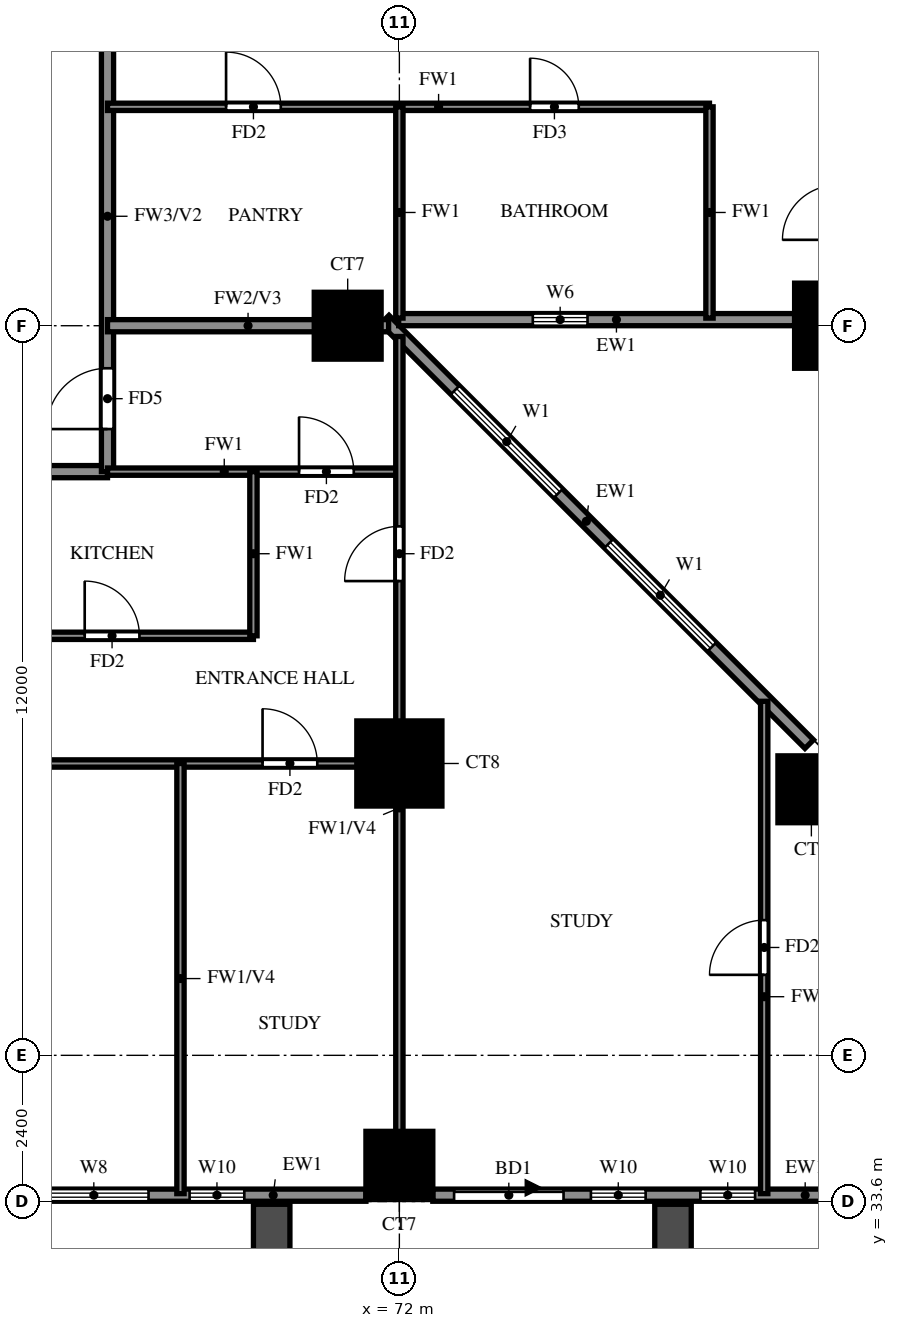
"""IFC4 building model, lengths in metres.
Left out: names, types, materials, properties, quantities, classifications, styles, units other than length and angle.
Written with IfcOpenShell. Run it as: python <this file> out.ifc"""

import sys

from ifc_helpers import new_model, si_unit, direction, frame, frame_2d, origin, origin_2d, place, context, subcontext, project, spatial, rectangle, extrude, source, transform, mapped, element, fill, save


model = new_model("IFC4")
c1 = context("Model", 3, precision=1e-05, world=origin(), true_north=direction((0.0, 1.0)))
c2 = subcontext(c1, "Body", "Model", "MODEL_VIEW")
j1 = project(units=[si_unit("LENGTHUNIT", "METRE"), si_unit("PLANEANGLEUNIT", "RADIAN")], contexts=[c1])
p1 = place(None, origin())
s1 = spatial("IfcSite", under=j1, at=p1, CompositionType="ELEMENT")
p2 = place(p1, origin())
s2 = spatial("IfcBuilding", under=s1, at=p2, CompositionType="ELEMENT")
p3 = place(p2, frame((0.0, 0.0, 51.5)))
s3 = spatial("IfcBuildingStorey", under=s2, at=p3, CompositionType="ELEMENT", Elevation=51.5)
m1 = source(origin(), c2, "Body", "SweptSolid", [
    extrude(rectangle(XDim=1.1, YDim=1.1, at=origin_2d()), origin(), (0.0, 0.0, 1.0), 3.18),
])
for number, where, z_axis, x_axis in (
    (1, (72.0, 34.2, 0.0), (0.0, 0.0, 1.0), (1.0, 0.0, 0.0)),
    (2, (78.776, 40.376, 0.0), (0.0, 0.0, 1.0), (1.0, 0.0, 0.0)),
):
    element("IfcColumn", number, at=place(p3, frame(where, z_axis=z_axis, x_axis=x_axis)), inside=s3, PredefinedType="COLUMN", context=c2, shape_type="MappedRepresentation", body=[
        mapped(m1, transform((0.0, 0.0, 0.0))),
    ])
m2 = source(origin(), c2, "Body", "SweptSolid", [
    extrude(rectangle(XDim=1.4, YDim=1.4, at=origin_2d()), origin(), (0.0, 0.0, 1.0), 3.18),
])
p4 = place(p3, frame((72.0, 40.8, 0.0), z_axis=(0.0, 0.0, 1.0), x_axis=(1.0, 0.0, 0.0)))
e3 = element("IfcColumn", 3, at=p4, inside=s3, PredefinedType="COLUMN", context=c2, shape_type="MappedRepresentation", body=[
    mapped(m2, transform((0.0, 0.0, 0.0))),
])
p5 = place(p3, frame((71.15, 48.0, 0.0), z_axis=(0.0, 0.0, 1.0), x_axis=(1.0, 0.0, 0.0)))
e4 = element("IfcColumn", 4, at=p5, inside=s3, PredefinedType="COLUMN", context=c2, shape_type="MappedRepresentation", body=[
    mapped(m1, transform((0.0, 0.0, 0.0))),
])
p6 = place(p3, frame((79.2, 48.0, 0.0), z_axis=(0.0, 0.0, 1.0), x_axis=(1.0, 0.0, 0.0)))
e5 = element("IfcColumn", 5, at=p6, inside=s3, PredefinedType="COLUMN", context=c2, shape_type="MappedRepresentation", body=[
    mapped(m2, transform((0.0, 0.0, 0.0))),
])
p7 = place(p3, frame((78.74, 41.118, 0.0), z_axis=(0.0, 0.0, 1.0), x_axis=(-0.707106781187, 0.707106781187, 0.0)))
e6 = element("IfcWall", 6, at=p7, inside=s3, PredefinedType="SOLIDWALL", context=c2, shape_type="SweptSolid", body=[
    extrude(rectangle(XDim=9.874, YDim=0.2, at=frame_2d((4.937, 0.0))), origin(), (0.0, 0.0, 1.0), 3.18),
])
p8 = place(p7, frame((2.264, 0.0, 0.6)))
e7 = element("IfcOpeningElement", 7, at=p8, cuts=e6, PredefinedType="OPENING", context=c2, shape_type="SweptSolid", body=[
    extrude(rectangle(XDim=2.4, YDim=2.4, at=frame_2d((1.2, 1.2))), frame((0.0, 0.11, 0.0), z_axis=(0.0, -1.0, 0.0), x_axis=(1.0, 0.0, 0.0)), (0.0, 0.0, 1.0), 0.22),
])
p9 = place(p7, frame((5.836, 0.0, 0.6)))
e8 = element("IfcOpeningElement", 8, at=p9, cuts=e6, PredefinedType="OPENING", context=c2, shape_type="SweptSolid", body=[
    extrude(rectangle(XDim=2.4, YDim=2.4, at=frame_2d((1.2, 1.2))), frame((0.0, 0.11, 0.0), z_axis=(0.0, -1.0, 0.0), x_axis=(1.0, 0.0, 0.0)), (0.0, 0.0, 1.0), 0.22),
])
p10 = place(p3, frame((71.989, 48.1, 0.0), z_axis=(0.0, 0.0, 1.0), x_axis=(1.0, 0.0, 0.0)))
e9 = element("IfcWall", 9, at=p10, inside=s3, PredefinedType="SOLIDWALL", context=c2, shape_type="SweptSolid", body=[
    extrude(rectangle(XDim=6.511, YDim=0.2, at=frame_2d((3.256, 0.0))), origin(), (0.0, 0.0, 1.0), 3.18),
])
p11 = place(p10, frame((2.206, 0.0, 1.5)))
e10 = element("IfcOpeningElement", 10, at=p11, cuts=e9, PredefinedType="OPENING", context=c2, shape_type="SweptSolid", body=[
    extrude(rectangle(XDim=0.9, YDim=0.9, at=frame_2d((0.45, 0.45))), frame((0.0, 0.11, 0.0), z_axis=(0.0, -1.0, 0.0), x_axis=(1.0, 0.0, 0.0)), (0.0, 0.0, 1.0), 0.22),
])
p12 = place(p3, frame((65.35, 33.7, 0.0), z_axis=(0.0, 0.0, 1.0), x_axis=(1.0, 0.0, 0.0)))
e11 = element("IfcWall", 11, at=p12, inside=s3, PredefinedType="SOLIDWALL", context=c2, shape_type="SweptSolid", body=[
    extrude(rectangle(XDim=6.1, YDim=0.2, at=frame_2d((3.05, 0.0))), origin(), (0.0, 0.0, 1.0), 3.18),
])
p13 = place(p12, frame((3.2, 0.0, 0.6)))
e12 = element("IfcOpeningElement", 12, at=p13, cuts=e11, PredefinedType="OPENING", context=c2, shape_type="SweptSolid", body=[
    extrude(rectangle(XDim=0.9, YDim=2.4, at=frame_2d((0.45, 1.2))), frame((0.0, 0.11, 0.0), z_axis=(0.0, -1.0, 0.0), x_axis=(1.0, 0.0, 0.0)), (0.0, 0.0, 1.0), 0.22),
])
p14 = place(p12, frame((0.725, 0.0, 0.6)))
e13 = element("IfcOpeningElement", 13, at=p14, cuts=e11, PredefinedType="OPENING", context=c2, shape_type="SweptSolid", body=[
    extrude(rectangle(XDim=1.8, YDim=2.4, at=frame_2d((0.9, 1.2))), frame((0.0, 0.11, 0.0), z_axis=(0.0, -1.0, 0.0), x_axis=(1.0, 0.0, 0.0)), (0.0, 0.0, 1.0), 0.22),
])
p15 = place(p3, frame((72.55, 33.7, 0.0), z_axis=(0.0, 0.0, 1.0), x_axis=(1.0, 0.0, 0.0)))
e14 = element("IfcWall", 14, at=p15, inside=s3, PredefinedType="SOLIDWALL", context=c2, shape_type="SweptSolid", body=[
    extrude(rectangle(XDim=13.609, YDim=0.2, at=frame_2d((6.804, 0.0))), origin(), (0.0, 0.0, 1.0), 3.18),
])
p16 = place(p15, frame((0.35, 0.0, 0.0)))
e15 = element("IfcOpeningElement", 15, at=p16, cuts=e14, PredefinedType="OPENING", context=c2, shape_type="SweptSolid", body=[
    extrude(rectangle(XDim=1.8, YDim=2.4, at=frame_2d((0.9, 1.2))), frame((0.0, 0.11, 0.0), z_axis=(0.0, -1.0, 0.0), x_axis=(1.0, 0.0, 0.0)), (0.0, 0.0, 1.0), 0.22),
])
p17 = place(p15, frame((2.6, 0.0, 0.6)))
e16 = element("IfcOpeningElement", 16, at=p17, cuts=e14, PredefinedType="OPENING", context=c2, shape_type="SweptSolid", body=[
    extrude(rectangle(XDim=0.9, YDim=2.4, at=frame_2d((0.45, 1.2))), frame((0.0, 0.11, 0.0), z_axis=(0.0, -1.0, 0.0), x_axis=(1.0, 0.0, 0.0)), (0.0, 0.0, 1.0), 0.22),
])
p18 = place(p15, frame((4.4, 0.0, 0.6)))
e17 = element("IfcOpeningElement", 17, at=p18, cuts=e14, PredefinedType="OPENING", context=c2, shape_type="SweptSolid", body=[
    extrude(rectangle(XDim=0.9, YDim=2.4, at=frame_2d((0.45, 1.2))), frame((0.0, 0.11, 0.0), z_axis=(0.0, -1.0, 0.0), x_axis=(1.0, 0.0, 0.0)), (0.0, 0.0, 1.0), 0.22),
])
p19 = place(p15, frame((6.536, 0.0, 0.6)))
e18 = element("IfcOpeningElement", 18, at=p19, cuts=e14, PredefinedType="OPENING", context=c2, shape_type="SweptSolid", body=[
    extrude(rectangle(XDim=2.4, YDim=2.4, at=frame_2d((1.2, 1.2))), frame((0.0, 0.11, 0.0), z_axis=(0.0, -1.0, 0.0), x_axis=(1.0, 0.0, 0.0)), (0.0, 0.0, 1.0), 0.22),
])
p20 = place(p15, frame((9.922, 0.0, 0.6)))
e19 = element("IfcOpeningElement", 19, at=p20, cuts=e14, PredefinedType="OPENING", context=c2, shape_type="SweptSolid", body=[
    extrude(rectangle(XDim=2.4, YDim=2.4, at=frame_2d((1.2, 1.2))), frame((0.0, 0.11, 0.0), z_axis=(0.0, -1.0, 0.0), x_axis=(1.0, 0.0, 0.0)), (0.0, 0.0, 1.0), 0.22),
])
for number, where, z_axis, x_axis in (
    (20, (69.9, 33.55, 0.0), (0.0, 0.0, 1.0), (0.0, -1.0, 0.0)),
    (21, (76.5, 33.55, 0.0), (0.0, 0.0, 1.0), (0.0, -1.0, 0.0)),
):
    element("IfcWall", number, at=place(p3, frame(where, z_axis=z_axis, x_axis=x_axis)), inside=s3, PredefinedType="SOLIDWALL", context=c2, shape_type="SweptSolid", body=[
        extrude(rectangle(XDim=2.65, YDim=0.6, at=frame_2d((1.325, 0.0))), origin(), (0.0, 0.0, 1.0), 2.85),
    ])
p21 = place(p3, frame((60.0, 45.6, 0.0), z_axis=(0.0, 0.0, 1.0), x_axis=(1.0, 0.0, 0.0)))
e22 = element("IfcWall", 22, at=p21, inside=s3, PredefinedType="SOLIDWALL", context=c2, shape_type="SweptSolid", body=[
    extrude(rectangle(XDim=7.2, YDim=0.2, at=frame_2d((3.6, 0.0))), origin(), (0.0, 0.0, 1.0), 3.18),
])
p22 = place(p3, frame((67.2, 45.6, 0.0), z_axis=(0.0, 0.0, 1.0), x_axis=(0.0, 1.0, 0.0)))
e23 = element("IfcWall", 23, at=p22, inside=s3, PredefinedType="SOLIDWALL", context=c2, shape_type="SweptSolid", body=[
    extrude(rectangle(XDim=8.4, YDim=0.2, at=frame_2d((4.2, 0.0))), origin(), (0.0, 0.0, 1.0), 3.18),
])
p23 = place(p22, frame((0.7, 0.0, 0.0)))
e24 = element("IfcOpeningElement", 24, at=p23, cuts=e23, PredefinedType="OPENING", context=c2, shape_type="SweptSolid", body=[
    extrude(rectangle(XDim=1.0, YDim=2.1, at=frame_2d((0.5, 1.05))), frame((0.0, 0.11, 0.0), z_axis=(0.0, -1.0, 0.0), x_axis=(1.0, 0.0, 0.0)), (0.0, 0.0, 1.0), 0.22),
])
p24 = place(p3, frame((67.2, 48.0, 0.0), z_axis=(0.0, 0.0, 1.0), x_axis=(1.0, 0.0, 0.0)))
e25 = element("IfcWall", 25, at=p24, inside=s3, PredefinedType="SOLIDWALL", context=c2, shape_type="SweptSolid", body=[
    extrude(rectangle(XDim=4.623, YDim=0.2, at=frame_2d((2.312, 0.0))), origin(), (0.0, 0.0, 1.0), 3.18),
])
p25 = place(p3, frame((60.0, 40.8, 0.0), z_axis=(0.0, 0.0, 1.0), x_axis=(1.0, 0.0, 0.0)))
e26 = element("IfcWall", 26, at=p25, inside=s3, PredefinedType="PARTITIONING", context=c2, shape_type="SweptSolid", body=[
    extrude(rectangle(XDim=12.0, YDim=0.12, at=frame_2d((6.0, 0.0))), origin(), (0.0, 0.0, 1.0), 3.18),
])
p26 = place(p25, frame((9.75, 0.0, 0.0)))
e27 = element("IfcOpeningElement", 27, at=p26, cuts=e26, PredefinedType="OPENING", context=c2, shape_type="SweptSolid", body=[
    extrude(rectangle(XDim=0.9, YDim=2.1, at=frame_2d((0.45, 1.05))), frame((0.0, 0.07, 0.0), z_axis=(0.0, -1.0, 0.0), x_axis=(1.0, 0.0, 0.0)), (0.0, 0.0, 1.0), 0.14),
])
p27 = place(p25, frame((2.55, 0.0, 0.0)))
e28 = element("IfcOpeningElement", 28, at=p27, cuts=e26, PredefinedType="OPENING", context=c2, shape_type="SweptSolid", body=[
    extrude(rectangle(XDim=1.5, YDim=2.1, at=frame_2d((0.75, 1.05))), frame((0.0, 0.07, 0.0), z_axis=(0.0, -1.0, 0.0), x_axis=(1.0, 0.0, 0.0)), (0.0, 0.0, 1.0), 0.14),
])
p28 = place(p3, frame((60.0, 42.9, 0.0), z_axis=(0.0, 0.0, 1.0), x_axis=(1.0, 0.0, 0.0)))
e29 = element("IfcWall", 29, at=p28, inside=s3, PredefinedType="PARTITIONING", context=c2, shape_type="SweptSolid", body=[
    extrude(rectangle(XDim=9.6, YDim=0.12, at=frame_2d((4.8, 0.0))), origin(), (0.0, 0.0, 1.0), 3.18),
])
p29 = place(p28, frame((6.825, 0.0, 0.0)))
e30 = element("IfcOpeningElement", 30, at=p29, cuts=e29, PredefinedType="OPENING", context=c2, shape_type="SweptSolid", body=[
    extrude(rectangle(XDim=0.9, YDim=2.1, at=frame_2d((0.45, 1.05))), frame((0.0, 0.07, 0.0), z_axis=(0.0, -1.0, 0.0), x_axis=(1.0, 0.0, 0.0)), (0.0, 0.0, 1.0), 0.14),
])
p30 = place(p28, frame((3.35, 0.0, 0.0)))
e31 = element("IfcOpeningElement", 31, at=p30, cuts=e29, PredefinedType="OPENING", context=c2, shape_type="SweptSolid", body=[
    extrude(rectangle(XDim=0.8, YDim=2.1, at=frame_2d((0.4, 1.05))), frame((0.0, 0.07, 0.0), z_axis=(0.0, -1.0, 0.0), x_axis=(1.0, 0.0, 0.0)), (0.0, 0.0, 1.0), 0.14),
])
p31 = place(p28, frame((0.875, 0.0, 0.0)))
e32 = element("IfcOpeningElement", 32, at=p31, cuts=e29, PredefinedType="OPENING", context=c2, shape_type="SweptSolid", body=[
    extrude(rectangle(XDim=0.8, YDim=2.1, at=frame_2d((0.4, 1.05))), frame((0.0, 0.07, 0.0), z_axis=(0.0, -1.0, 0.0), x_axis=(1.0, 0.0, 0.0)), (0.0, 0.0, 1.0), 0.14),
])
p32 = place(p3, frame((67.2, 45.6, 0.0), z_axis=(0.0, 0.0, 1.0), x_axis=(1.0, 0.0, 0.0)))
e33 = element("IfcWall", 33, at=p32, inside=s3, PredefinedType="PARTITIONING", context=c2, shape_type="SweptSolid", body=[
    extrude(rectangle(XDim=4.8, YDim=0.12, at=frame_2d((2.4, 0.0))), origin(), (0.0, 0.0, 1.0), 3.18),
])
p33 = place(p32, frame((3.15, 0.0, 0.0)))
e34 = element("IfcOpeningElement", 34, at=p33, cuts=e33, PredefinedType="OPENING", context=c2, shape_type="SweptSolid", body=[
    extrude(rectangle(XDim=0.9, YDim=2.1, at=frame_2d((0.45, 1.05))), frame((0.0, 0.07, 0.0), z_axis=(0.0, -1.0, 0.0), x_axis=(1.0, 0.0, 0.0)), (0.0, 0.0, 1.0), 0.14),
])
p34 = place(p3, frame((67.2, 51.6, 0.0), z_axis=(0.0, 0.0, 1.0), x_axis=(1.0, 0.0, 0.0)))
e35 = element("IfcWall", 35, at=p34, inside=s3, PredefinedType="PARTITIONING", context=c2, shape_type="SweptSolid", body=[
    extrude(rectangle(XDim=9.9, YDim=0.12, at=frame_2d((4.95, 0.0))), origin(), (0.0, 0.0, 1.0), 3.18),
])
p35 = place(p34, frame((6.95, 0.0, 0.0)))
e36 = element("IfcOpeningElement", 36, at=p35, cuts=e35, PredefinedType="OPENING", context=c2, shape_type="SweptSolid", body=[
    extrude(rectangle(XDim=0.8, YDim=2.1, at=frame_2d((0.4, 1.05))), frame((0.0, 0.07, 0.0), z_axis=(0.0, -1.0, 0.0), x_axis=(1.0, 0.0, 0.0)), (0.0, 0.0, 1.0), 0.14),
])
p36 = place(p34, frame((1.95, 0.0, 0.0)))
e37 = element("IfcOpeningElement", 37, at=p36, cuts=e35, PredefinedType="OPENING", context=c2, shape_type="SweptSolid", body=[
    extrude(rectangle(XDim=0.9, YDim=2.1, at=frame_2d((0.45, 1.05))), frame((0.0, 0.07, 0.0), z_axis=(0.0, -1.0, 0.0), x_axis=(1.0, 0.0, 0.0)), (0.0, 0.0, 1.0), 0.14),
])
p37 = place(p3, frame((68.4, 33.725, 0.0), z_axis=(0.0, 0.0, 1.0), x_axis=(0.0, 1.0, 0.0)))
e38 = element("IfcWall", 38, at=p37, inside=s3, PredefinedType="PARTITIONING", context=c2, shape_type="SweptSolid", body=[
    extrude(rectangle(XDim=7.075, YDim=0.12, at=frame_2d((3.538, 0.0))), origin(), (0.0, 0.0, 1.0), 2.28),
])
p38 = place(p3, frame((69.6, 42.9, 0.0), z_axis=(0.0, 0.0, 1.0), x_axis=(0.0, 1.0, 0.0)))
e39 = element("IfcWall", 39, at=p38, inside=s3, PredefinedType="PARTITIONING", context=c2, shape_type="SweptSolid", body=[
    extrude(rectangle(XDim=2.7, YDim=0.12, at=frame_2d((1.35, 0.0))), origin(), (0.0, 0.0, 1.0), 3.18),
])
p39 = place(p3, frame((72.0, 33.725, 0.0), z_axis=(0.0, 0.0, 1.0), x_axis=(0.0, 1.0, 0.0)))
e40 = element("IfcWall", 40, at=p39, inside=s3, PredefinedType="PARTITIONING", context=c2, shape_type="SweptSolid", body=[
    extrude(rectangle(XDim=14.098, YDim=0.12, at=frame_2d((7.049, 0.0))), origin(), (0.0, 0.0, 1.0), 2.28),
])
p40 = place(p39, frame((10.075, 0.0, 0.0)))
e41 = element("IfcOpeningElement", 41, at=p40, cuts=e40, PredefinedType="OPENING", context=c2, shape_type="SweptSolid", body=[
    extrude(rectangle(XDim=0.9, YDim=2.1, at=frame_2d((0.45, 1.05))), frame((0.0, 0.07, 0.0), z_axis=(0.0, -1.0, 0.0), x_axis=(1.0, 0.0, 0.0)), (0.0, 0.0, 1.0), 0.14),
])
for number, where, z_axis, x_axis in (
    (42, (72.0, 48.125, 0.0), (0.0, 0.0, 1.0), (0.0, 1.0, 0.0)),
    (43, (77.1, 48.125, 0.0), (0.0, 0.0, 1.0), (0.0, 1.0, 0.0)),
):
    element("IfcWall", number, at=place(p3, frame(where, z_axis=z_axis, x_axis=x_axis)), inside=s3, PredefinedType="PARTITIONING", context=c2, shape_type="SweptSolid", body=[
        extrude(rectangle(XDim=3.475, YDim=0.12, at=frame_2d((1.738, 0.0))), origin(), (0.0, 0.0, 1.0), 3.18),
    ])
p41 = place(p3, frame((78.0, 33.725, 0.0), z_axis=(0.0, 0.0, 1.0), x_axis=(0.0, 1.0, 0.0)))
e44 = element("IfcWall", 44, at=p41, inside=s3, PredefinedType="PARTITIONING", context=c2, shape_type="SweptSolid", body=[
    extrude(rectangle(XDim=8.098, YDim=0.12, at=frame_2d((4.049, 0.0))), origin(), (0.0, 0.0, 1.0), 2.28),
])
p42 = place(p41, frame((3.599, 0.0, 0.0)))
e45 = element("IfcOpeningElement", 45, at=p42, cuts=e44, PredefinedType="OPENING", context=c2, shape_type="SweptSolid", body=[
    extrude(rectangle(XDim=0.9, YDim=2.1, at=frame_2d((0.45, 1.05))), frame((0.0, 0.07, 0.0), z_axis=(0.0, -1.0, 0.0), x_axis=(1.0, 0.0, 0.0)), (0.0, 0.0, 1.0), 0.14),
])
p43 = place(p8, origin())
e46 = element("IfcWindow", 46, at=p43, inside=s3, PartitioningType="DOUBLE_PANEL_VERTICAL", PredefinedType="WINDOW", context=c2, shape_type="SweptSolid", body=[
    extrude(rectangle(XDim=2.4, YDim=2.4, at=frame_2d((1.2, 1.2))), frame((0.0, 0.03, 0.0), z_axis=(0.0, -1.0, 0.0), x_axis=(1.0, 0.0, 0.0)), (0.0, 0.0, 1.0), 0.06),
])
fill(e7, e46)
p44 = place(p9, origin())
e47 = element("IfcWindow", 47, at=p44, inside=s3, PartitioningType="DOUBLE_PANEL_VERTICAL", PredefinedType="WINDOW", context=c2, shape_type="SweptSolid", body=[
    extrude(rectangle(XDim=2.4, YDim=2.4, at=frame_2d((1.2, 1.2))), frame((0.0, 0.03, 0.0), z_axis=(0.0, -1.0, 0.0), x_axis=(1.0, 0.0, 0.0)), (0.0, 0.0, 1.0), 0.06),
])
fill(e8, e47)
p45 = place(p11, origin())
e48 = element("IfcWindow", 48, at=p45, inside=s3, PartitioningType="SINGLE_PANEL", PredefinedType="WINDOW", context=c2, shape_type="SweptSolid", body=[
    extrude(rectangle(XDim=0.9, YDim=0.9, at=frame_2d((0.45, 0.45))), frame((0.0, 0.03, 0.0), z_axis=(0.0, -1.0, 0.0), x_axis=(1.0, 0.0, 0.0)), (0.0, 0.0, 1.0), 0.06),
])
fill(e10, e48)
p46 = place(p13, origin())
e49 = element("IfcWindow", 49, at=p46, inside=s3, PartitioningType="SINGLE_PANEL", PredefinedType="WINDOW", context=c2, shape_type="SweptSolid", body=[
    extrude(rectangle(XDim=0.9, YDim=2.4, at=frame_2d((0.45, 1.2))), frame((0.0, 0.03, 0.0), z_axis=(0.0, -1.0, 0.0), x_axis=(1.0, 0.0, 0.0)), (0.0, 0.0, 1.0), 0.06),
])
fill(e12, e49)
p47 = place(p14, origin())
e50 = element("IfcWindow", 50, at=p47, inside=s3, PartitioningType="DOUBLE_PANEL_VERTICAL", PredefinedType="WINDOW", context=c2, shape_type="SweptSolid", body=[
    extrude(rectangle(XDim=1.8, YDim=2.4, at=frame_2d((0.9, 1.2))), frame((0.0, 0.03, 0.0), z_axis=(0.0, -1.0, 0.0), x_axis=(1.0, 0.0, 0.0)), (0.0, 0.0, 1.0), 0.06),
])
fill(e13, e50)
p48 = place(p16, origin())
e51 = element("IfcDoor", 51, at=p48, inside=s3, OperationType="DOUBLE_DOOR_SLIDING", PredefinedType="DOOR", context=c2, shape_type="SweptSolid", body=[
    extrude(rectangle(XDim=1.8, YDim=2.4, at=frame_2d((0.9, 1.2))), frame((0.0, 0.025, 0.0), z_axis=(0.0, -1.0, 0.0), x_axis=(1.0, 0.0, 0.0)), (0.0, 0.0, 1.0), 0.05),
])
fill(e15, e51)
p49 = place(p17, origin())
e52 = element("IfcWindow", 52, at=p49, inside=s3, PartitioningType="SINGLE_PANEL", PredefinedType="WINDOW", context=c2, shape_type="SweptSolid", body=[
    extrude(rectangle(XDim=0.9, YDim=2.4, at=frame_2d((0.45, 1.2))), frame((0.0, 0.03, 0.0), z_axis=(0.0, -1.0, 0.0), x_axis=(1.0, 0.0, 0.0)), (0.0, 0.0, 1.0), 0.06),
])
fill(e16, e52)
p50 = place(p18, origin())
e53 = element("IfcWindow", 53, at=p50, inside=s3, PartitioningType="SINGLE_PANEL", PredefinedType="WINDOW", context=c2, shape_type="SweptSolid", body=[
    extrude(rectangle(XDim=0.9, YDim=2.4, at=frame_2d((0.45, 1.2))), frame((0.0, 0.03, 0.0), z_axis=(0.0, -1.0, 0.0), x_axis=(1.0, 0.0, 0.0)), (0.0, 0.0, 1.0), 0.06),
])
fill(e17, e53)
p51 = place(p35, origin())
e54 = element("IfcDoor", 54, at=p51, inside=s3, OperationType="SINGLE_SWING_RIGHT", PredefinedType="DOOR", context=c2, shape_type="SweptSolid", body=[
    extrude(rectangle(XDim=0.8, YDim=2.1, at=frame_2d((0.4, 1.05))), frame((0.0, 0.025, 0.0), z_axis=(0.0, -1.0, 0.0), x_axis=(1.0, 0.0, 0.0)), (0.0, 0.0, 1.0), 0.05),
])
fill(e36, e54)
p52 = place(p36, origin())
e55 = element("IfcDoor", 55, at=p52, inside=s3, OperationType="SINGLE_SWING_LEFT", PredefinedType="DOOR", context=c2, shape_type="SweptSolid", body=[
    extrude(rectangle(XDim=0.9, YDim=2.1, at=frame_2d((0.45, 1.05))), frame((0.0, 0.025, 0.0), z_axis=(0.0, -1.0, 0.0), x_axis=(1.0, 0.0, 0.0)), (0.0, 0.0, 1.0), 0.05),
])
fill(e37, e55)
p53 = place(p33, origin())
e56 = element("IfcDoor", 56, at=p53, inside=s3, OperationType="SINGLE_SWING_LEFT", PredefinedType="DOOR", context=c2, shape_type="SweptSolid", body=[
    extrude(rectangle(XDim=0.9, YDim=2.1, at=frame_2d((0.45, 1.05))), frame((0.0, 0.025, 0.0), z_axis=(0.0, -1.0, 0.0), x_axis=(1.0, 0.0, 0.0)), (0.0, 0.0, 1.0), 0.05),
])
fill(e34, e56)
p54 = place(p23, origin())
e57 = element("IfcDoor", 57, at=p54, inside=s3, OperationType="SINGLE_SWING_LEFT", PredefinedType="DOOR", context=c2, shape_type="SweptSolid", body=[
    extrude(rectangle(XDim=1.0, YDim=2.1, at=frame_2d((0.5, 1.05))), frame((0.0, 0.025, 0.0), z_axis=(0.0, -1.0, 0.0), x_axis=(1.0, 0.0, 0.0)), (0.0, 0.0, 1.0), 0.05),
])
fill(e24, e57)
p55 = place(p26, origin())
e58 = element("IfcDoor", 58, at=p55, inside=s3, OperationType="SINGLE_SWING_RIGHT", PredefinedType="DOOR", context=c2, shape_type="SweptSolid", body=[
    extrude(rectangle(XDim=0.9, YDim=2.1, at=frame_2d((0.45, 1.05))), frame((0.0, 0.025, 0.0), z_axis=(0.0, -1.0, 0.0), x_axis=(1.0, 0.0, 0.0)), (0.0, 0.0, 1.0), 0.05),
])
fill(e27, e58)
p56 = place(p29, origin())
e59 = element("IfcDoor", 59, at=p56, inside=s3, OperationType="SINGLE_SWING_LEFT", PredefinedType="DOOR", context=c2, shape_type="SweptSolid", body=[
    extrude(rectangle(XDim=0.9, YDim=2.1, at=frame_2d((0.45, 1.05))), frame((0.0, 0.025, 0.0), z_axis=(0.0, -1.0, 0.0), x_axis=(1.0, 0.0, 0.0)), (0.0, 0.0, 1.0), 0.05),
])
fill(e30, e59)
p57 = place(p40, origin())
e60 = element("IfcDoor", 60, at=p57, inside=s3, OperationType="SINGLE_SWING_LEFT", PredefinedType="DOOR", context=c2, shape_type="SweptSolid", body=[
    extrude(rectangle(XDim=0.9, YDim=2.1, at=frame_2d((0.45, 1.05))), frame((0.0, 0.025, 0.0), z_axis=(0.0, -1.0, 0.0), x_axis=(1.0, 0.0, 0.0)), (0.0, 0.0, 1.0), 0.05),
])
fill(e41, e60)
p58 = place(p42, origin())
e61 = element("IfcDoor", 61, at=p58, inside=s3, OperationType="SINGLE_SWING_RIGHT", PredefinedType="DOOR", context=c2, shape_type="SweptSolid", body=[
    extrude(rectangle(XDim=0.9, YDim=2.1, at=frame_2d((0.45, 1.05))), frame((0.0, 0.025, 0.0), z_axis=(0.0, -1.0, 0.0), x_axis=(1.0, 0.0, 0.0)), (0.0, 0.0, 1.0), 0.05),
])
fill(e45, e61)
save(model, sys.argv[1])
